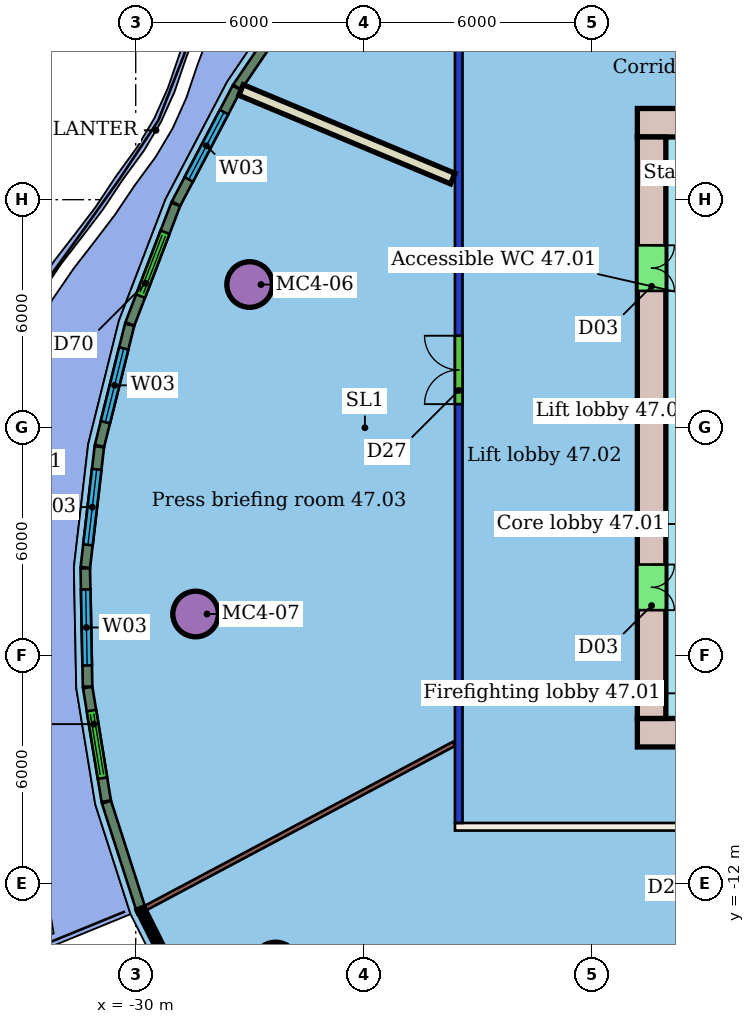
"""IFC4 building model, lengths in metres.
Left out: names, types, materials, properties, quantities, classifications, styles, units other than length and angle.
Written with IfcOpenShell. Run it as: python <this file> out.ifc"""

import sys

from ifc_helpers import new_model, si_unit, direction, frame, frame_2d, origin, origin_2d, place, context, subcontext, project, spatial, rectangle, hollow_circle, extrude, element, fill, save


model = new_model("IFC4")
c1 = context("Model", 3, precision=1e-05, world=origin(), true_north=direction((0.0, 1.0)))
c2 = subcontext(c1, "Body", "Model", "MODEL_VIEW")
j1 = project(units=[si_unit("LENGTHUNIT", "METRE"), si_unit("PLANEANGLEUNIT", "RADIAN")], contexts=[c1])
p1 = place(None, origin())
s1 = spatial("IfcSite", under=j1, at=p1, CompositionType="ELEMENT")
p2 = place(p1, origin())
s2 = spatial("IfcBuilding", under=s1, at=p2, CompositionType="ELEMENT")
p3 = place(p2, frame((0.0, 0.0, 195.7)))
s3 = spatial("IfcBuildingStorey", under=s2, at=p3, CompositionType="ELEMENT", Elevation=195.7)
for number, where, z_axis, x_axis in (
    (1, (-27.003, 3.768, 0.0), (0.0, 0.0, 1.0), (1.0, 0.0, 0.0)),
    (2, (-28.424, -4.901, 0.0), (0.0, 0.0, 1.0), (1.0, 0.0, 0.0)),
    (3, (-26.318, -14.137, 0.0), (0.0, 0.0, 1.0), (1.0, 0.0, 0.0)),
):
    element("IfcColumn", number, at=place(p3, frame(where, z_axis=z_axis, x_axis=x_axis)), inside=s3, PredefinedType="COLUMN", context=c2, shape_type="SweptSolid", body=[
        extrude(hollow_circle(Radius=0.6, WallThickness=0.045, at=origin_2d()), origin(), (0.0, 0.0, 1.0), 3.45),
    ])
p4 = place(p3, frame((9.6, -10.5, 0.0), z_axis=(0.0, 0.0, 1.0), x_axis=(-1.0, 0.0, 0.0)))
e4 = element("IfcWall", 4, at=p4, inside=s3, PredefinedType="PARTITIONING", context=c2, shape_type="SweptSolid", body=[
    extrude(rectangle(XDim=31.2, YDim=0.2, at=frame_2d((15.6, 0.0))), origin(), (0.0, 0.0, 1.0), 3.45),
])
p5 = place(p4, frame((22.273, 0.0, 0.0)))
e5 = element("IfcOpeningElement", 5, at=p5, cuts=e4, PredefinedType="OPENING", context=c2, shape_type="SweptSolid", body=[
    extrude(rectangle(XDim=1.8, YDim=2.1, at=frame_2d((0.9, 1.05))), frame((0.0, 0.11, 0.0), z_axis=(0.0, -1.0, 0.0), x_axis=(1.0, 0.0, 0.0)), (0.0, 0.0, 1.0), 0.22),
])
p6 = place(p4, frame((16.826, 0.0, 0.0)))
e6 = element("IfcOpeningElement", 6, at=p6, cuts=e4, PredefinedType="OPENING", context=c2, shape_type="SweptSolid", body=[
    extrude(rectangle(XDim=1.0, YDim=2.4, at=frame_2d((0.5, 1.2))), frame((0.0, 0.11, 0.0), z_axis=(0.0, -1.0, 0.0), x_axis=(1.0, 0.0, 0.0)), (0.0, 0.0, 1.0), 0.22),
])
p7 = place(p4, frame((8.926, 0.0, 0.0)))
e7 = element("IfcOpeningElement", 7, at=p7, cuts=e4, PredefinedType="OPENING", context=c2, shape_type="SweptSolid", body=[
    extrude(rectangle(XDim=1.0, YDim=2.4, at=frame_2d((0.5, 1.2))), frame((0.0, 0.11, 0.0), z_axis=(0.0, -1.0, 0.0), x_axis=(1.0, 0.0, 0.0)), (0.0, 0.0, 1.0), 0.22),
])
p8 = place(p3, frame((-21.5, -10.4, 0.0), z_axis=(0.0, 0.0, 1.0), x_axis=(0.0, 1.0, 0.0)))
e8 = element("IfcWall", 8, at=p8, inside=s3, PredefinedType="PARTITIONING", context=c2, shape_type="SweptSolid", body=[
    extrude(rectangle(XDim=20.8, YDim=0.2, at=frame_2d((10.4, 0.0))), origin(), (0.0, 0.0, 1.0), 3.05),
])
p9 = place(p8, frame((11.02, 0.0, 0.0)))
e9 = element("IfcOpeningElement", 9, at=p9, cuts=e8, PredefinedType="OPENING", context=c2, shape_type="SweptSolid", body=[
    extrude(rectangle(XDim=1.8, YDim=2.4, at=frame_2d((0.9, 1.2))), frame((0.0, 0.11, 0.0), z_axis=(0.0, -1.0, 0.0), x_axis=(1.0, 0.0, 0.0)), (0.0, 0.0, 1.0), 0.22),
])
p10 = place(p3, frame((-27.229, 8.887, 0.0), z_axis=(0.0, 0.0, 1.0), x_axis=(0.922430941615, -0.386162087667, 0.0)))
e10 = element("IfcWall", 10, at=p10, inside=s3, PredefinedType="PARTITIONING", context=c2, shape_type="SweptSolid", body=[
    extrude(rectangle(XDim=6.039, YDim=0.3, at=frame_2d((3.02, 0.0))), origin(), (0.0, 0.0, 1.0), 3.45),
])
p11 = place(p3, frame((-29.743, -12.638, 0.0), z_axis=(0.0, 0.0, 1.0), x_axis=(0.8827357417, 0.46986978018, 0.0)))
e11 = element("IfcWall", 11, at=p11, inside=s3, PredefinedType="PARTITIONING", context=c2, shape_type="SweptSolid", body=[
    extrude(rectangle(XDim=9.191, YDim=0.125, at=frame_2d((4.596, 0.0))), origin(), (0.0, 0.0, 1.0), 3.45),
])
p12 = place(p3, frame((-25.392, 11.818, 0.0), z_axis=(0.0, 0.0, 1.0), x_axis=(-0.561162409818, -0.827705714495, 0.0)))
e12 = element("IfcWall", 12, at=p12, inside=s3, PredefinedType="SOLIDWALL", context=c2, shape_type="SweptSolid", body=[
    extrude(rectangle(XDim=3.452, YDim=0.25, at=frame_2d((1.726, 0.0))), origin(), (0.0, 0.0, 1.0), 3.1),
])
p13 = place(p3, frame((-27.341, 8.941, 0.0), z_axis=(0.0, 0.0, 1.0), x_axis=(-0.464508293803, -0.885568769203, 0.0)))
e13 = element("IfcWall", 13, at=p13, inside=s3, PredefinedType="SOLIDWALL", context=c2, shape_type="SweptSolid", body=[
    extrude(rectangle(XDim=3.439, YDim=0.25, at=frame_2d((1.719, 0.0))), origin(), (0.0, 0.0, 1.0), 3.1),
])
p14 = place(p13, frame((0.719, 0.0, 0.9)))
e14 = element("IfcOpeningElement", 14, at=p14, cuts=e13, PredefinedType="OPENING", context=c2, shape_type="SweptSolid", body=[
    extrude(rectangle(XDim=2.0, YDim=2.1, at=frame_2d((1.0, 1.05))), frame((0.0, 0.135, 0.0), z_axis=(0.0, -1.0, 0.0), x_axis=(1.0, 0.0, 0.0)), (0.0, 0.0, 1.0), 0.27),
])
p15 = place(p3, frame((-28.948, 5.875, 0.0), z_axis=(0.0, 0.0, 1.0), x_axis=(-0.358011880991, -0.933717030513, 0.0)))
e15 = element("IfcWall", 15, at=p15, inside=s3, PredefinedType="SOLIDWALL", context=c2, shape_type="SweptSolid", body=[
    extrude(rectangle(XDim=3.367, YDim=0.25, at=frame_2d((1.683, 0.0))), origin(), (0.0, 0.0, 1.0), 3.1),
])
p16 = place(p15, frame((0.783, 0.0, 0.0)))
e16 = element("IfcOpeningElement", 16, at=p16, cuts=e15, PredefinedType="OPENING", context=c2, shape_type="SweptSolid", body=[
    extrude(rectangle(XDim=1.8, YDim=2.4, at=frame_2d((0.9, 1.2))), frame((0.0, 0.135, 0.0), z_axis=(0.0, -1.0, 0.0), x_axis=(1.0, 0.0, 0.0)), (0.0, 0.0, 1.0), 0.27),
])
p17 = place(p3, frame((-30.16, 2.71, 0.0), z_axis=(0.0, 0.0, 1.0), x_axis=(-0.241591009496, -0.970378165527, 0.0)))
e17 = element("IfcWall", 17, at=p17, inside=s3, PredefinedType="SOLIDWALL", context=c2, shape_type="SweptSolid", body=[
    extrude(rectangle(XDim=3.284, YDim=0.25, at=frame_2d((1.642, 0.0))), origin(), (0.0, 0.0, 1.0), 3.1),
])
p18 = place(p17, frame((0.642, 0.0, 0.9)))
e18 = element("IfcOpeningElement", 18, at=p18, cuts=e17, PredefinedType="OPENING", context=c2, shape_type="SweptSolid", body=[
    extrude(rectangle(XDim=2.0, YDim=2.1, at=frame_2d((1.0, 1.05))), frame((0.0, 0.135, 0.0), z_axis=(0.0, -1.0, 0.0), x_axis=(1.0, 0.0, 0.0)), (0.0, 0.0, 1.0), 0.27),
])
p19 = place(p3, frame((-30.958, -0.501, 0.0), z_axis=(0.0, 0.0, 1.0), x_axis=(-0.115316862034, -0.99332875793, 0.0)))
e19 = element("IfcWall", 19, at=p19, inside=s3, PredefinedType="SOLIDWALL", context=c2, shape_type="SweptSolid", body=[
    extrude(rectangle(XDim=3.197, YDim=0.25, at=frame_2d((1.598, 0.0))), origin(), (0.0, 0.0, 1.0), 3.1),
])
p20 = place(p19, frame((0.598, 0.0, 0.9)))
e20 = element("IfcOpeningElement", 20, at=p20, cuts=e19, PredefinedType="OPENING", context=c2, shape_type="SweptSolid", body=[
    extrude(rectangle(XDim=2.0, YDim=2.1, at=frame_2d((1.0, 1.05))), frame((0.0, 0.135, 0.0), z_axis=(0.0, -1.0, 0.0), x_axis=(1.0, 0.0, 0.0)), (0.0, 0.0, 1.0), 0.27),
])
p21 = place(p3, frame((-31.327, -3.701, 0.0), z_axis=(0.0, 0.0, 1.0), x_axis=(0.01970563503, -0.999805825122, 0.0)))
e21 = element("IfcWall", 21, at=p21, inside=s3, PredefinedType="SOLIDWALL", context=c2, shape_type="SweptSolid", body=[
    extrude(rectangle(XDim=3.11, YDim=0.25, at=frame_2d((1.555, 0.0))), origin(), (0.0, 0.0, 1.0), 3.1),
])
p22 = place(p21, frame((0.555, 0.0, 0.9)))
e22 = element("IfcOpeningElement", 22, at=p22, cuts=e21, PredefinedType="OPENING", context=c2, shape_type="SweptSolid", body=[
    extrude(rectangle(XDim=2.0, YDim=2.1, at=frame_2d((1.0, 1.05))), frame((0.0, 0.135, 0.0), z_axis=(0.0, -1.0, 0.0), x_axis=(1.0, 0.0, 0.0)), (0.0, 0.0, 1.0), 0.27),
])
p23 = place(p3, frame((-31.264, -6.836, 0.0), z_axis=(0.0, 0.0, 1.0), x_axis=(0.161248834654, -0.986913782112, 0.0)))
e23 = element("IfcWall", 23, at=p23, inside=s3, PredefinedType="SOLIDWALL", context=c2, shape_type="SweptSolid", body=[
    extrude(rectangle(XDim=3.03, YDim=0.25, at=frame_2d((1.515, 0.0))), origin(), (0.0, 0.0, 1.0), 3.1),
])
p24 = place(p23, frame((0.615, 0.0, 0.0)))
e24 = element("IfcOpeningElement", 24, at=p24, cuts=e23, PredefinedType="OPENING", context=c2, shape_type="SweptSolid", body=[
    extrude(rectangle(XDim=1.8, YDim=2.4, at=frame_2d((0.9, 1.2))), frame((0.0, 0.135, 0.0), z_axis=(0.0, -1.0, 0.0), x_axis=(1.0, 0.0, 0.0)), (0.0, 0.0, 1.0), 0.27),
])
p25 = place(p3, frame((-30.769, -9.852, 0.0), z_axis=(0.0, 0.0, 1.0), x_axis=(0.305979420663, -0.952038126406, 0.0)))
e25 = element("IfcWall", 25, at=p25, inside=s3, PredefinedType="SOLIDWALL", context=c2, shape_type="SweptSolid", body=[
    extrude(rectangle(XDim=2.921, YDim=0.25, at=frame_2d((1.46, 0.0))), origin(), (0.0, 0.0, 1.0), 3.1),
])
p26 = place(p3, frame((-6.0, 8.025, 0.0), z_axis=(0.0, 0.0, 1.0), x_axis=(-1.0, 0.0, 0.0)))
e26 = element("IfcWall", 26, at=p26, inside=s3, PredefinedType="SHEAR", context=c2, shape_type="SweptSolid", body=[
    extrude(rectangle(XDim=10.8, YDim=0.75, at=frame_2d((5.4, 0.0))), origin(), (0.0, 0.0, 1.0), 3.3),
])
p27 = place(p26, frame((5.2, 0.0, 0.0)))
e27 = element("IfcOpeningElement", 27, at=p27, cuts=e26, PredefinedType="OPENING", context=c2, shape_type="SweptSolid", body=[
    extrude(rectangle(XDim=1.2, YDim=2.1, at=frame_2d((0.6, 1.05))), frame((0.0, 0.385, 0.0), z_axis=(0.0, -1.0, 0.0), x_axis=(1.0, 0.0, 0.0)), (0.0, 0.0, 1.0), 0.77),
])
p28 = place(p3, frame((-16.8, -8.025, 0.0), z_axis=(0.0, 0.0, 1.0), x_axis=(1.0, 0.0, 0.0)))
e28 = element("IfcWall", 28, at=p28, inside=s3, PredefinedType="SHEAR", context=c2, shape_type="SweptSolid", body=[
    extrude(rectangle(XDim=21.6, YDim=0.75, at=frame_2d((10.8, 0.0))), origin(), (0.0, 0.0, 1.0), 3.3),
])
p29 = place(p28, frame((4.8, 0.0, 0.0)))
e29 = element("IfcOpeningElement", 29, at=p29, cuts=e28, PredefinedType="OPENING", context=c2, shape_type="SweptSolid", body=[
    extrude(rectangle(XDim=1.2, YDim=2.1, at=frame_2d((0.6, 1.05))), frame((0.0, 0.385, 0.0), z_axis=(0.0, -1.0, 0.0), x_axis=(1.0, 0.0, 0.0)), (0.0, 0.0, 1.0), 0.77),
])
p30 = place(p3, frame((-16.425, 7.65, 0.0), z_axis=(0.0, 0.0, 1.0), x_axis=(0.0, -1.0, 0.0)))
e30 = element("IfcWall", 30, at=p30, inside=s3, PredefinedType="SHEAR", context=c2, shape_type="SweptSolid", body=[
    extrude(rectangle(XDim=15.3, YDim=0.75, at=frame_2d((7.65, 0.0))), origin(), (0.0, 0.0, 1.0), 3.3),
])
p31 = place(p30, frame((11.25, 0.0, 0.0)))
e31 = element("IfcOpeningElement", 31, at=p31, cuts=e30, PredefinedType="OPENING", context=c2, shape_type="SweptSolid", body=[
    extrude(rectangle(XDim=1.2, YDim=2.1, at=frame_2d((0.6, 1.05))), frame((0.0, 0.385, 0.0), z_axis=(0.0, -1.0, 0.0), x_axis=(1.0, 0.0, 0.0)), (0.0, 0.0, 1.0), 0.77),
])
p32 = place(p30, frame((2.85, 0.0, 0.0)))
e32 = element("IfcOpeningElement", 32, at=p32, cuts=e30, PredefinedType="OPENING", context=c2, shape_type="SweptSolid", body=[
    extrude(rectangle(XDim=1.2, YDim=2.1, at=frame_2d((0.6, 1.05))), frame((0.0, 0.385, 0.0), z_axis=(0.0, -1.0, 0.0), x_axis=(1.0, 0.0, 0.0)), (0.0, 0.0, 1.0), 0.77),
])
p33 = place(p9, origin())
e33 = element("IfcDoor", 33, at=p33, inside=s3, OperationType="DOUBLE_DOOR_SINGLE_SWING", PredefinedType="DOOR", context=c2, shape_type="SweptSolid", body=[
    extrude(rectangle(XDim=1.8, YDim=2.4, at=frame_2d((0.9, 1.2))), frame((0.0, 0.025, 0.0), z_axis=(0.0, -1.0, 0.0), x_axis=(1.0, 0.0, 0.0)), (0.0, 0.0, 1.0), 0.05),
])
fill(e9, e33)
p34 = place(p14, origin())
e34 = element("IfcWindow", 34, at=p34, inside=s3, PartitioningType="SINGLE_PANEL", PredefinedType="WINDOW", context=c2, shape_type="SweptSolid", body=[
    extrude(rectangle(XDim=2.0, YDim=2.1, at=frame_2d((1.0, 1.05))), frame((0.0, 0.03, 0.0), z_axis=(0.0, -1.0, 0.0), x_axis=(1.0, 0.0, 0.0)), (0.0, 0.0, 1.0), 0.06),
])
fill(e14, e34)
p35 = place(p16, origin())
e35 = element("IfcDoor", 35, at=p35, inside=s3, OperationType="DOUBLE_DOOR_SLIDING", PredefinedType="DOOR", context=c2, shape_type="SweptSolid", body=[
    extrude(rectangle(XDim=1.8, YDim=2.4, at=frame_2d((0.9, 1.2))), frame((0.0, 0.025, 0.0), z_axis=(0.0, -1.0, 0.0), x_axis=(1.0, 0.0, 0.0)), (0.0, 0.0, 1.0), 0.05),
])
fill(e16, e35)
p36 = place(p18, origin())
e36 = element("IfcWindow", 36, at=p36, inside=s3, PartitioningType="SINGLE_PANEL", PredefinedType="WINDOW", context=c2, shape_type="SweptSolid", body=[
    extrude(rectangle(XDim=2.0, YDim=2.1, at=frame_2d((1.0, 1.05))), frame((0.0, 0.03, 0.0), z_axis=(0.0, -1.0, 0.0), x_axis=(1.0, 0.0, 0.0)), (0.0, 0.0, 1.0), 0.06),
])
fill(e18, e36)
p37 = place(p20, origin())
e37 = element("IfcWindow", 37, at=p37, inside=s3, PartitioningType="SINGLE_PANEL", PredefinedType="WINDOW", context=c2, shape_type="SweptSolid", body=[
    extrude(rectangle(XDim=2.0, YDim=2.1, at=frame_2d((1.0, 1.05))), frame((0.0, 0.03, 0.0), z_axis=(0.0, -1.0, 0.0), x_axis=(1.0, 0.0, 0.0)), (0.0, 0.0, 1.0), 0.06),
])
fill(e20, e37)
p38 = place(p22, origin())
e38 = element("IfcWindow", 38, at=p38, inside=s3, PartitioningType="SINGLE_PANEL", PredefinedType="WINDOW", context=c2, shape_type="SweptSolid", body=[
    extrude(rectangle(XDim=2.0, YDim=2.1, at=frame_2d((1.0, 1.05))), frame((0.0, 0.03, 0.0), z_axis=(0.0, -1.0, 0.0), x_axis=(1.0, 0.0, 0.0)), (0.0, 0.0, 1.0), 0.06),
])
fill(e22, e38)
p39 = place(p24, origin())
e39 = element("IfcDoor", 39, at=p39, inside=s3, OperationType="DOUBLE_DOOR_SLIDING", PredefinedType="DOOR", context=c2, shape_type="SweptSolid", body=[
    extrude(rectangle(XDim=1.8, YDim=2.4, at=frame_2d((0.9, 1.2))), frame((0.0, 0.025, 0.0), z_axis=(0.0, -1.0, 0.0), x_axis=(1.0, 0.0, 0.0)), (0.0, 0.0, 1.0), 0.05),
])
fill(e24, e39)
p40 = place(p31, origin())
e40 = element("IfcDoor", 40, at=p40, inside=s3, OperationType="DOUBLE_DOOR_SINGLE_SWING", PredefinedType="NOTDEFINED", context=c2, shape_type="SweptSolid", body=[
    extrude(rectangle(XDim=1.2, YDim=2.1, at=frame_2d((0.6, 1.05))), frame((0.0, 0.025, 0.0), z_axis=(0.0, -1.0, 0.0), x_axis=(1.0, 0.0, 0.0)), (0.0, 0.0, 1.0), 0.05),
])
fill(e31, e40)
p41 = place(p32, origin())
e41 = element("IfcDoor", 41, at=p41, inside=s3, OperationType="DOUBLE_DOOR_SINGLE_SWING", PredefinedType="NOTDEFINED", context=c2, shape_type="SweptSolid", body=[
    extrude(rectangle(XDim=1.2, YDim=2.1, at=frame_2d((0.6, 1.05))), frame((0.0, 0.025, 0.0), z_axis=(0.0, -1.0, 0.0), x_axis=(1.0, 0.0, 0.0)), (0.0, 0.0, 1.0), 0.05),
])
fill(e32, e41)
save(model, sys.argv[1])
